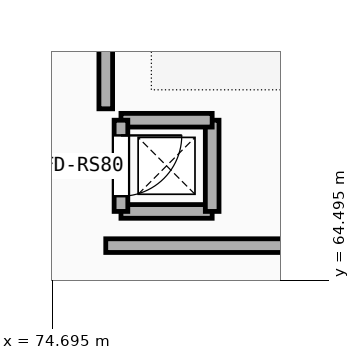
"""IFC4 building model, lengths in metres.
Left out: names, types, materials, properties, quantities, classifications, styles, units other than length and angle.
Written with IfcOpenShell. Run it as: python <this file> out.ifc"""

import sys

from ifc_helpers import new_model, si_unit, direction, frame, frame_2d, origin, place, context, subcontext, project, spatial, rectangle, extrude, element, fill, save


model = new_model("IFC4")
c1 = context("Model", 3, precision=1e-05, world=origin(), true_north=direction((0.0, 1.0)))
c2 = subcontext(c1, "Body", "Model", "MODEL_VIEW")
j1 = project(units=[si_unit("LENGTHUNIT", "METRE"), si_unit("PLANEANGLEUNIT", "RADIAN")], contexts=[c1])
p1 = place(None, origin())
s1 = spatial("IfcSite", under=j1, at=p1, CompositionType="ELEMENT")
p2 = place(p1, origin())
s2 = spatial("IfcBuilding", under=s1, at=p2, CompositionType="ELEMENT")
p3 = place(p2, frame((0.0, 0.0, 13.8)))
s3 = spatial("IfcBuildingStorey", under=s2, at=p3, CompositionType="ELEMENT", Elevation=13.8)
p4 = place(p3, frame((75.4, 64.95, 0.0), z_axis=(0.0, 0.0, 1.0), x_axis=(1.0, 0.0, 0.0)))
e1 = element("IfcWall", 1, at=p4, inside=s3, PredefinedType="PARTITIONING", context=c2, shape_type="SweptSolid", body=[
    extrude(rectangle(XDim=11.26, YDim=0.18, at=frame_2d((5.63, 0.0))), origin(), (0.0, 0.0, 1.0), 3.17),
])
p5 = place(p3, frame((75.4, 66.75, 0.0), z_axis=(0.0, 0.0, 1.0), x_axis=(0.0, 1.0, 0.0)))
e2 = element("IfcWall", 2, at=p5, inside=s3, PredefinedType="PARTITIONING", context=c2, shape_type="SweptSolid", body=[
    extrude(rectangle(XDim=30.75, YDim=0.18, at=frame_2d((15.375, 0.0))), origin(), (0.0, 0.0, 1.0), 3.2),
])
p6 = place(p5, frame((6.413, 0.0, -0.01)))
e3 = element("IfcOpeningElement", 3, at=p6, cuts=e2, PredefinedType="OPENING", context=c2, shape_type="SweptSolid", body=[
    extrude(rectangle(XDim=1.6, YDim=2.21, at=frame_2d((0.8, 1.105))), frame((0.0, 0.1, 0.0), z_axis=(0.0, -1.0, 0.0), x_axis=(1.0, 0.0, 0.0)), (0.0, 0.0, 1.0), 0.2),
])
p7 = place(p3, frame((75.6, 65.4, 0.0), z_axis=(0.0, 0.0, 1.0), x_axis=(1.0, 0.0, 0.0)))
e4 = element("IfcWall", 4, at=p7, inside=s3, PredefinedType="SOLIDWALL", context=c2, shape_type="SweptSolid", body=[
    extrude(rectangle(XDim=1.2, YDim=0.18, at=frame_2d((0.6, 0.0))), origin(), (0.0, 0.0, 1.0), 3.69),
])
p8 = place(p3, frame((76.8, 65.4, 0.0), z_axis=(0.0, 0.0, 1.0), x_axis=(0.0, 1.0, 0.0)))
e5 = element("IfcWall", 5, at=p8, inside=s3, PredefinedType="SOLIDWALL", context=c2, shape_type="SweptSolid", body=[
    extrude(rectangle(XDim=1.2, YDim=0.18, at=frame_2d((0.6, 0.0))), origin(), (0.0, 0.0, 1.0), 3.69),
])
p9 = place(p3, frame((76.8, 66.6, 0.0), z_axis=(0.0, 0.0, 1.0), x_axis=(-1.0, 0.0, 0.0)))
e6 = element("IfcWall", 6, at=p9, inside=s3, PredefinedType="SOLIDWALL", context=c2, shape_type="SweptSolid", body=[
    extrude(rectangle(XDim=1.2, YDim=0.18, at=frame_2d((0.6, 0.0))), origin(), (0.0, 0.0, 1.0), 3.69),
])
p10 = place(p3, frame((75.6, 66.6, 0.0), z_axis=(0.0, 0.0, 1.0), x_axis=(0.0, -1.0, 0.0)))
e7 = element("IfcWall", 7, at=p10, inside=s3, PredefinedType="SOLIDWALL", context=c2, shape_type="SweptSolid", body=[
    extrude(rectangle(XDim=1.2, YDim=0.18, at=frame_2d((0.6, 0.0))), origin(), (0.0, 0.0, 1.0), 3.69),
])
p11 = place(p10, frame((0.2, 0.0, -0.01)))
e8 = element("IfcOpeningElement", 8, at=p11, cuts=e7, PredefinedType="OPENING", context=c2, shape_type="SweptSolid", body=[
    extrude(rectangle(XDim=0.8, YDim=2.06, at=frame_2d((0.4, 1.03))), frame((0.0, 0.1, 0.0), z_axis=(0.0, -1.0, 0.0), x_axis=(1.0, 0.0, 0.0)), (0.0, 0.0, 1.0), 0.2),
])
p12 = place(p11, frame((0.0, 0.0, 0.01)))
e9 = element("IfcDoor", 9, at=p12, inside=s3, OperationType="SINGLE_SWING_LEFT", PredefinedType="DOOR", context=c2, shape_type="SweptSolid", body=[
    extrude(rectangle(XDim=0.8, YDim=2.05, at=frame_2d((0.4, 1.025))), frame((0.0, 0.025, 0.0), z_axis=(0.0, -1.0, 0.0), x_axis=(1.0, 0.0, 0.0)), (0.0, 0.0, 1.0), 0.05),
])
fill(e8, e9)
save(model, sys.argv[1])
